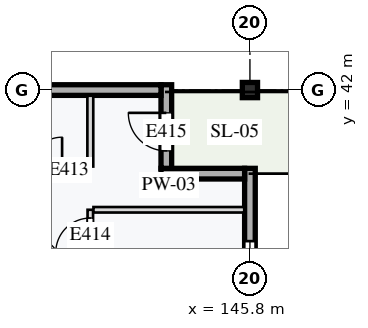
"""IFC4 building model, lengths in metres.
Left out: names, types, materials, properties, quantities, classifications, styles, units other than length and angle.
Written with IfcOpenShell. Run it as: python <this file> out.ifc"""

import sys

from ifc_helpers import new_model, si_unit, direction, frame, frame_2d, origin, origin_2d, place, context, subcontext, project, spatial, rectangle, extrude, element, fill, save


model = new_model("IFC4")
c1 = context("Model", 3, precision=1e-05, world=origin(), true_north=direction((0.0, 1.0)))
c2 = subcontext(c1, "Body", "Model", "MODEL_VIEW")
j1 = project(units=[si_unit("LENGTHUNIT", "METRE"), si_unit("PLANEANGLEUNIT", "RADIAN")], contexts=[c1])
p1 = place(None, origin())
s1 = spatial("IfcSite", under=j1, at=p1, CompositionType="ELEMENT")
p2 = place(p1, origin())
s2 = spatial("IfcBuilding", under=s1, at=p2, CompositionType="ELEMENT")
p3 = place(p2, frame((0.0, 0.0, 34.0)))
s3 = spatial("IfcBuildingStorey", under=s2, at=p3, CompositionType="ELEMENT", Elevation=34.0)
p4 = place(p3, frame((145.8, 42.0, 0.0), z_axis=(0.0, 0.0, 1.0), x_axis=(1.0, 0.0, 0.0)))
e1 = element("IfcColumn", 1, at=p4, inside=s3, PredefinedType="COLUMN", context=c2, shape_type="SweptSolid", body=[
    extrude(rectangle(XDim=0.4, YDim=0.4, at=origin_2d()), origin(), (0.0, 0.0, 1.0), 3.2),
])
p5 = place(p3, frame((145.8, 35.6, 0.0), z_axis=(0.0, 0.0, 1.0), x_axis=(0.0, 1.0, 0.0)))
e2 = element("IfcWall", 2, at=p5, inside=s3, PredefinedType="STANDARD", context=c2, shape_type="SweptSolid", body=[
    extrude(rectangle(XDim=4.34, YDim=0.28, at=frame_2d((2.17, 0.0))), origin(), (0.0, 0.0, 1.0), 2.6),
])
p6 = place(p5, frame((0.625, 0.0, 0.85)))
e3 = element("IfcOpeningElement", 3, at=p6, cuts=e2, PredefinedType="OPENING", context=c2, shape_type="SweptSolid", body=[
    extrude(rectangle(XDim=1.8, YDim=1.35, at=frame_2d((0.9, 0.675))), frame((0.0, 0.15, 0.0), z_axis=(0.0, -1.0, 0.0), x_axis=(1.0, 0.0, 0.0)), (0.0, 0.0, 1.0), 0.3),
])
p7 = place(p3, frame((145.66, 39.8, 0.0), z_axis=(0.0, 0.0, 1.0), x_axis=(-1.0, 0.0, 0.0)))
e4 = element("IfcWall", 4, at=p7, inside=s3, PredefinedType="STANDARD", context=c2, shape_type="SweptSolid", body=[
    extrude(rectangle(XDim=2.2, YDim=0.28, at=frame_2d((1.1, 0.0))), origin(), (0.0, 0.0, 1.0), 2.97),
])
p8 = place(p3, frame((143.6, 39.94, 0.0), z_axis=(0.0, 0.0, 1.0), x_axis=(0.0, 1.0, 0.0)))
e5 = element("IfcWall", 5, at=p8, inside=s3, PredefinedType="STANDARD", context=c2, shape_type="SweptSolid", body=[
    extrude(rectangle(XDim=2.2, YDim=0.28, at=frame_2d((1.1, 0.0))), origin(), (0.0, 0.0, 1.0), 2.97),
])
p9 = place(p8, frame((0.46, 0.0, 0.0)))
e6 = element("IfcOpeningElement", 6, at=p9, cuts=e5, PredefinedType="OPENING", context=c2, shape_type="SweptSolid", body=[
    extrude(rectangle(XDim=1.0, YDim=2.15, at=frame_2d((0.5, 1.075))), frame((0.0, 0.15, 0.0), z_axis=(0.0, -1.0, 0.0), x_axis=(1.0, 0.0, 0.0)), (0.0, 0.0, 1.0), 0.3),
])
p10 = place(p3, frame((139.4, 42.0, 0.0), z_axis=(0.0, 0.0, 1.0), x_axis=(1.0, 0.0, 0.0)))
e7 = element("IfcWall", 7, at=p10, inside=s3, PredefinedType="STANDARD", context=c2, shape_type="SweptSolid", body=[
    extrude(rectangle(XDim=4.06, YDim=0.28, at=frame_2d((2.03, 0.0))), origin(), (0.0, 0.0, 1.0), 2.65),
])
p11 = place(p3, frame((139.298, 39.9, 0.0), z_axis=(0.0, 0.0, 1.0), x_axis=(1.0, 0.0, 0.0)))
e8 = element("IfcWall", 8, at=p11, inside=s3, PredefinedType="PARTITIONING", context=c2, shape_type="SweptSolid", body=[
    extrude(rectangle(XDim=2.302, YDim=0.155, at=frame_2d((1.151, 0.0))), origin(), (0.0, 0.0, 1.0), 2.935),
])
p12 = place(p11, frame((0.7, 0.0, 0.0)))
e9 = element("IfcOpeningElement", 9, at=p12, cuts=e8, PredefinedType="OPENING", context=c2, shape_type="SweptSolid", body=[
    extrude(rectangle(XDim=0.86, YDim=2.12, at=frame_2d((0.43, 1.06))), frame((0.0, 0.087, 0.0), z_axis=(0.0, -1.0, 0.0), x_axis=(1.0, 0.0, 0.0)), (0.0, 0.0, 1.0), 0.175),
])
p13 = place(p3, frame((141.6, 39.988, 0.0), z_axis=(0.0, 0.0, 1.0), x_axis=(0.0, 1.0, 0.0)))
e10 = element("IfcWall", 10, at=p13, inside=s3, PredefinedType="PARTITIONING", context=c2, shape_type="SweptSolid", body=[
    extrude(rectangle(XDim=1.863, YDim=0.155, at=frame_2d((0.931, 0.0))), origin(), (0.0, 0.0, 1.0), 2.935),
])
p14 = place(p3, frame((141.6, 37.373, 0.0), z_axis=(0.0, 0.0, 1.0), x_axis=(0.0, 1.0, 0.0)))
e11 = element("IfcWall", 11, at=p14, inside=s3, PredefinedType="PARTITIONING", context=c2, shape_type="SweptSolid", body=[
    extrude(rectangle(XDim=1.478, YDim=0.145, at=frame_2d((0.739, 0.0))), origin(), (0.0, 0.0, 1.0), 2.935),
])
p15 = place(p14, frame((0.35, 0.0, 0.0)))
e12 = element("IfcOpeningElement", 12, at=p15, cuts=e11, PredefinedType="OPENING", context=c2, shape_type="SweptSolid", body=[
    extrude(rectangle(XDim=0.91, YDim=2.14, at=frame_2d((0.455, 1.07))), frame((0.0, 0.083, 0.0), z_axis=(0.0, -1.0, 0.0), x_axis=(1.0, 0.0, 0.0)), (0.0, 0.0, 1.0), 0.165),
])
p16 = place(p3, frame((141.683, 38.85, 0.0), z_axis=(0.0, 0.0, 1.0), x_axis=(1.0, 0.0, 0.0)))
e13 = element("IfcWall", 13, at=p16, inside=s3, PredefinedType="PARTITIONING", context=c2, shape_type="SweptSolid", body=[
    extrude(rectangle(XDim=3.967, YDim=0.145, at=frame_2d((1.984, 0.0))), origin(), (0.0, 0.0, 1.0), 2.935),
])
p17 = place(p6, origin())
e14 = element("IfcWindow", 14, at=p17, inside=s3, PartitioningType="SINGLE_PANEL", PredefinedType="WINDOW", context=c2, shape_type="SweptSolid", body=[
    extrude(rectangle(XDim=1.8, YDim=1.35, at=frame_2d((0.9, 0.675))), frame((0.0, 0.03, 0.0), z_axis=(0.0, -1.0, 0.0), x_axis=(1.0, 0.0, 0.0)), (0.0, 0.0, 1.0), 0.06),
])
fill(e3, e14)
p18 = place(p9, origin())
e15 = element("IfcDoor", 15, at=p18, inside=s3, OperationType="SINGLE_SWING_RIGHT", PredefinedType="DOOR", context=c2, shape_type="SweptSolid", body=[
    extrude(rectangle(XDim=1.0, YDim=2.15, at=frame_2d((0.5, 1.075))), frame((0.0, 0.025, 0.0), z_axis=(0.0, -1.0, 0.0), x_axis=(1.0, 0.0, 0.0)), (0.0, 0.0, 1.0), 0.05),
])
fill(e6, e15)
p19 = place(p12, origin())
e16 = element("IfcDoor", 16, at=p19, inside=s3, OperationType="SINGLE_SWING_RIGHT", PredefinedType="DOOR", context=c2, shape_type="SweptSolid", body=[
    extrude(rectangle(XDim=0.86, YDim=2.12, at=frame_2d((0.43, 1.06))), frame((0.0, 0.025, 0.0), z_axis=(0.0, -1.0, 0.0), x_axis=(1.0, 0.0, 0.0)), (0.0, 0.0, 1.0), 0.05),
])
fill(e9, e16)
p20 = place(p15, origin())
e17 = element("IfcDoor", 17, at=p20, inside=s3, OperationType="SINGLE_SWING_LEFT", PredefinedType="DOOR", context=c2, shape_type="SweptSolid", body=[
    extrude(rectangle(XDim=0.91, YDim=2.14, at=frame_2d((0.455, 1.07))), frame((0.0, 0.025, 0.0), z_axis=(0.0, -1.0, 0.0), x_axis=(1.0, 0.0, 0.0)), (0.0, 0.0, 1.0), 0.05),
])
fill(e12, e17)
save(model, sys.argv[1])
